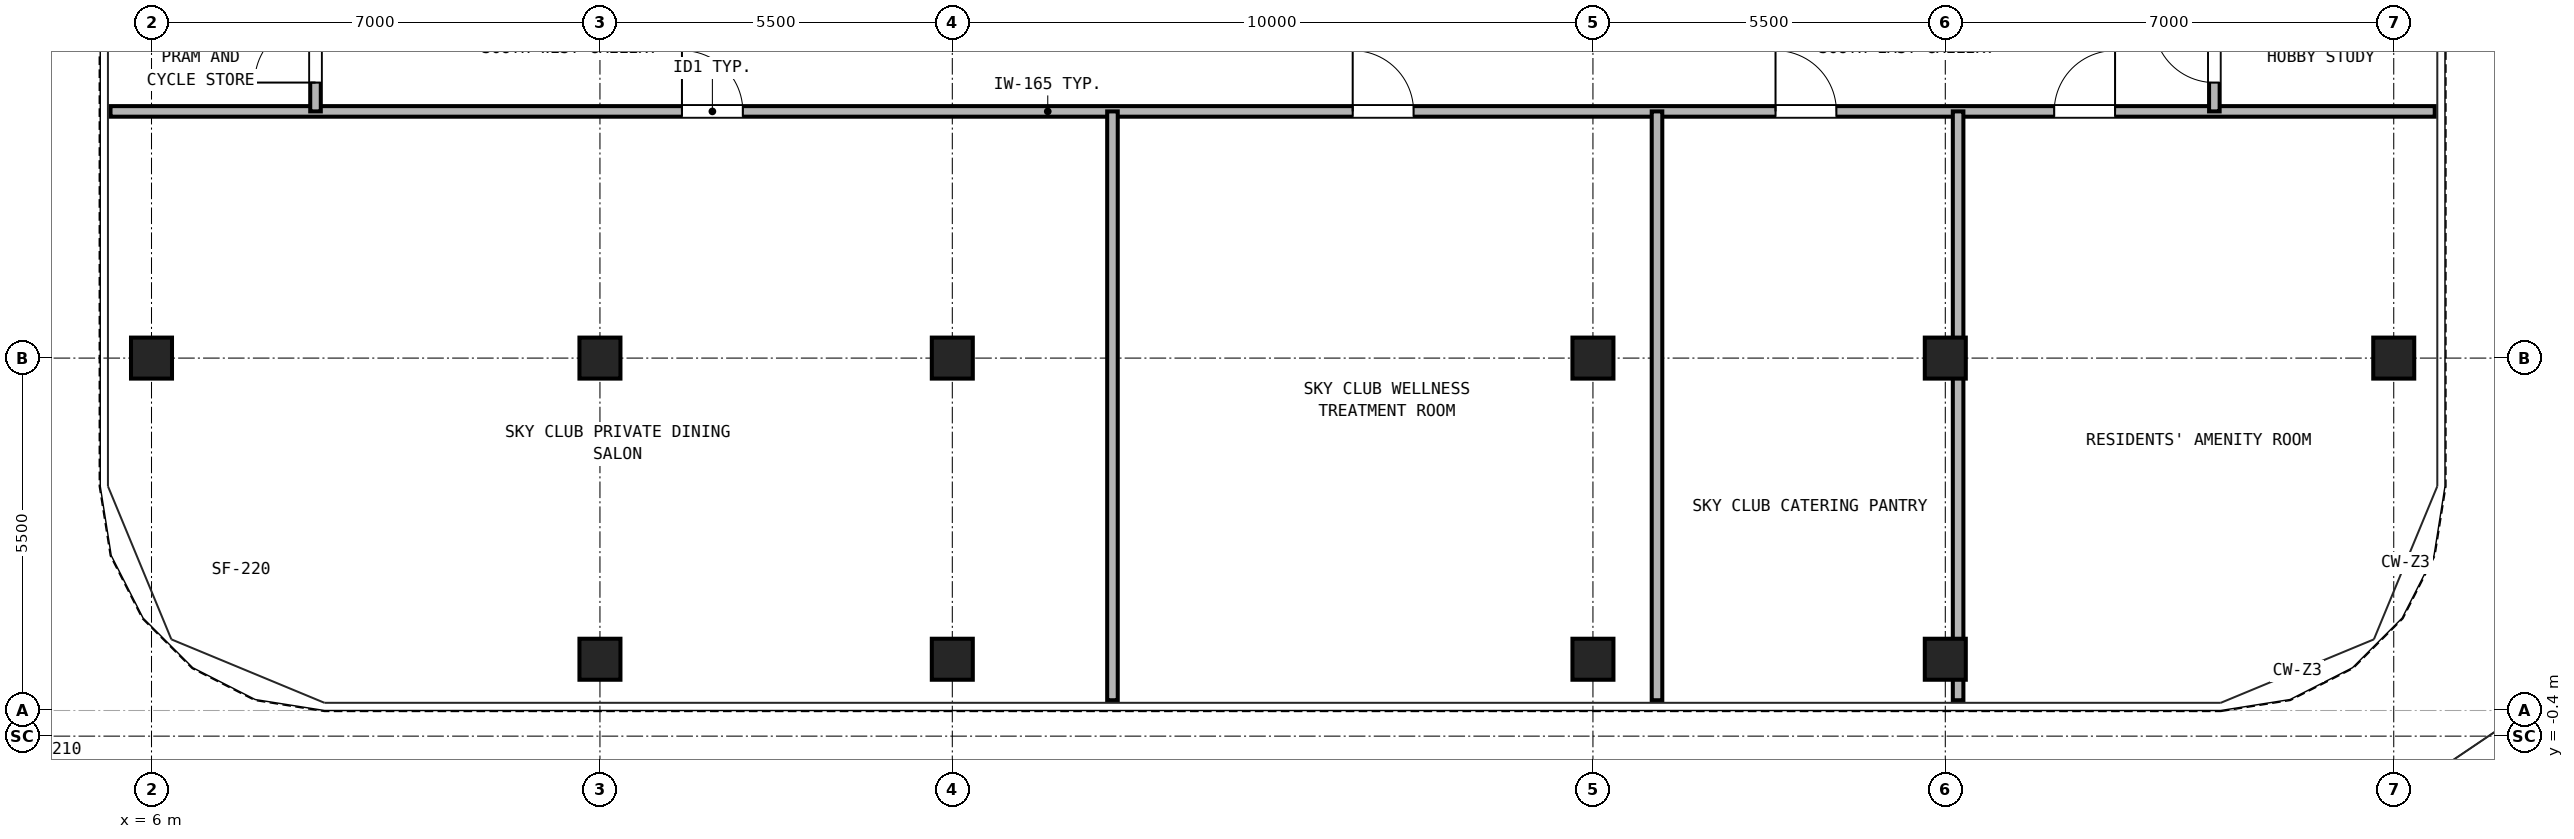
"""IFC4 building model, lengths in metres.
Left out: names, types, materials, properties, quantities, classifications, styles, units other than length and angle.
Written with IfcOpenShell. Run it as: python <this file> out.ifc"""

import sys

from ifc_helpers import new_model, si_unit, direction, frame, frame_2d, origin, origin_2d, place, context, subcontext, project, spatial, rectangle, hollow_rectangle, extrude, source, transform, mapped, element, fill, save


model = new_model("IFC4")
c1 = context("Model", 3, precision=1e-05, world=origin(), true_north=direction((0.0, 1.0)))
c2 = subcontext(c1, "Body", "Model", "MODEL_VIEW")
j1 = project(units=[si_unit("LENGTHUNIT", "METRE"), si_unit("PLANEANGLEUNIT", "RADIAN")], contexts=[c1])
p1 = place(None, origin())
s1 = spatial("IfcSite", under=j1, at=p1, CompositionType="ELEMENT")
p2 = place(p1, origin())
s2 = spatial("IfcBuilding", under=s1, at=p2, CompositionType="ELEMENT")
p3 = place(p2, frame((0.0, 0.0, 268.1)))
s3 = spatial("IfcBuildingStorey", under=s2, at=p3, CompositionType="ELEMENT", Elevation=268.1)
m1 = source(origin(), c2, "Body", "SweptSolid", [
    extrude(hollow_rectangle(XDim=0.64, YDim=0.64, WallThickness=0.035, at=origin_2d()), origin(), (0.0, 0.0, 1.0), 2.98),
])
for number, where, z_axis, x_axis in (
    (1, (13.0, 0.8, 0.0), (0.0, 0.0, 1.0), (1.0, 0.0, 0.0)),
    (2, (18.5, 0.8, 0.0), (0.0, 0.0, 1.0), (1.0, 0.0, 0.0)),
    (3, (28.5, 0.8, 0.0), (0.0, 0.0, 1.0), (1.0, 0.0, 0.0)),
    (4, (34.0, 0.8, 0.0), (0.0, 0.0, 1.0), (1.0, 0.0, 0.0)),
    (5, (6.0, 5.5, 0.0), (0.0, 0.0, 1.0), (1.0, 0.0, 0.0)),
    (6, (41.0, 5.5, 0.0), (0.0, 0.0, 1.0), (1.0, 0.0, 0.0)),
    (7, (13.0, 5.5, 0.0), (0.0, 0.0, 1.0), (1.0, 0.0, 0.0)),
    (8, (18.5, 5.5, 0.0), (0.0, 0.0, 1.0), (1.0, 0.0, 0.0)),
    (9, (28.5, 5.5, 0.0), (0.0, 0.0, 1.0), (1.0, 0.0, 0.0)),
    (10, (34.0, 5.5, 0.0), (0.0, 0.0, 1.0), (1.0, 0.0, 0.0)),
):
    element("IfcColumn", number, at=place(p3, frame(where, z_axis=z_axis, x_axis=x_axis)), inside=s3, PredefinedType="COLUMN", context=c2, shape_type="MappedRepresentation", body=[
        mapped(m1, transform((0.0, 0.0, 0.0), x_axis=(1.0, 0.0, 0.0), y_axis=(0.0, 1.0, 0.0), z_axis=(0.0, 0.0, 1.0), scale=1.0)),
    ])
p4 = place(p3, frame((5.36, 9.35, 0.0), z_axis=(0.0, 0.0, 1.0), x_axis=(1.0, 0.0, 0.0)))
e11 = element("IfcWall", 11, at=p4, inside=s3, PredefinedType="PARTITIONING", context=c2, shape_type="SweptSolid", body=[
    extrude(rectangle(XDim=36.28, YDim=0.165, at=frame_2d((18.14, 0.0))), origin(), (0.0, 0.0, 1.0), 2.98),
])
p5 = place(p4, frame((8.92, 0.0, 0.0)))
e12 = element("IfcOpeningElement", 12, at=p5, cuts=e11, PredefinedType="OPENING", context=c2, shape_type="SweptSolid", body=[
    extrude(rectangle(XDim=0.95, YDim=2.15, at=frame_2d((0.475, 1.075))), frame((0.0, 0.093, 0.0), z_axis=(0.0, -1.0, 0.0), x_axis=(1.0, 0.0, 0.0)), (0.0, 0.0, 1.0), 0.185),
])
p6 = place(p4, frame((19.39, 0.0, 0.0)))
e13 = element("IfcOpeningElement", 13, at=p6, cuts=e11, PredefinedType="OPENING", context=c2, shape_type="SweptSolid", body=[
    extrude(rectangle(XDim=0.95, YDim=2.15, at=frame_2d((0.475, 1.075))), frame((0.0, 0.093, 0.0), z_axis=(0.0, -1.0, 0.0), x_axis=(1.0, 0.0, 0.0)), (0.0, 0.0, 1.0), 0.185),
])
p7 = place(p4, frame((25.99, 0.0, 0.0)))
e14 = element("IfcOpeningElement", 14, at=p7, cuts=e11, PredefinedType="OPENING", context=c2, shape_type="SweptSolid", body=[
    extrude(rectangle(XDim=0.95, YDim=2.15, at=frame_2d((0.475, 1.075))), frame((0.0, 0.093, 0.0), z_axis=(0.0, -1.0, 0.0), x_axis=(1.0, 0.0, 0.0)), (0.0, 0.0, 1.0), 0.185),
])
p8 = place(p4, frame((30.34, 0.0, 0.0)))
e15 = element("IfcOpeningElement", 15, at=p8, cuts=e11, PredefinedType="OPENING", context=c2, shape_type="SweptSolid", body=[
    extrude(rectangle(XDim=0.95, YDim=2.15, at=frame_2d((0.475, 1.075))), frame((0.0, 0.093, 0.0), z_axis=(0.0, -1.0, 0.0), x_axis=(1.0, 0.0, 0.0)), (0.0, 0.0, 1.0), 0.185),
])
p9 = place(p3, frame((8.56, 9.35, 0.0), z_axis=(0.0, 0.0, 1.0), x_axis=(0.0, 1.0, 0.0)))
e16 = element("IfcWall", 16, at=p9, inside=s3, PredefinedType="PARTITIONING", context=c2, shape_type="SweptSolid", body=[
    extrude(rectangle(XDim=2.0, YDim=0.165, at=frame_2d((1.0, 0.0))), origin(), (0.0, 0.0, 1.0), 2.98),
])
p10 = place(p9, frame((0.45, 0.0, 0.0)))
e17 = element("IfcOpeningElement", 17, at=p10, cuts=e16, PredefinedType="OPENING", context=c2, shape_type="SweptSolid", body=[
    extrude(rectangle(XDim=0.95, YDim=2.15, at=frame_2d((0.475, 1.075))), frame((0.0, 0.093, 0.0), z_axis=(0.0, -1.0, 0.0), x_axis=(1.0, 0.0, 0.0)), (0.0, 0.0, 1.0), 0.185),
])
p11 = place(p3, frame((38.2, 9.35, 0.0), z_axis=(0.0, 0.0, 1.0), x_axis=(0.0, 1.0, 0.0)))
e18 = element("IfcWall", 18, at=p11, inside=s3, PredefinedType="PARTITIONING", context=c2, shape_type="SweptSolid", body=[
    extrude(rectangle(XDim=2.0, YDim=0.165, at=frame_2d((1.0, 0.0))), origin(), (0.0, 0.0, 1.0), 2.98),
])
p12 = place(p11, frame((0.45, 0.0, 0.0)))
e19 = element("IfcOpeningElement", 19, at=p12, cuts=e18, PredefinedType="OPENING", context=c2, shape_type="SweptSolid", body=[
    extrude(rectangle(XDim=0.95, YDim=2.15, at=frame_2d((0.475, 1.075))), frame((0.0, 0.093, 0.0), z_axis=(0.0, -1.0, 0.0), x_axis=(1.0, 0.0, 0.0)), (0.0, 0.0, 1.0), 0.185),
])
for number, where, z_axis, x_axis in (
    (20, (21.0, 0.16, 0.0), (0.0, 0.0, 1.0), (0.0, 1.0, 0.0)),
    (21, (29.5, 0.16, 0.0), (0.0, 0.0, 1.0), (0.0, 1.0, 0.0)),
):
    element("IfcWall", number, at=place(p3, frame(where, z_axis=z_axis, x_axis=x_axis)), inside=s3, PredefinedType="PARTITIONING", context=c2, shape_type="SweptSolid", body=[
        extrude(rectangle(XDim=9.19, YDim=0.165, at=frame_2d((4.595, 0.0))), origin(), (0.0, 0.0, 1.0), 2.98),
    ])
p13 = place(p3, frame((34.2, 0.16, 0.0), z_axis=(0.0, 0.0, 1.0), x_axis=(0.0, 1.0, 0.0)))
e22 = element("IfcWall", 22, at=p13, inside=s3, PredefinedType="PARTITIONING", context=c2, shape_type="SweptSolid", body=[
    extrude(rectangle(XDim=9.19, YDim=0.165, at=frame_2d((4.595, 0.0))), origin(), (0.0, 0.0, 1.0), 2.428),
])
p14 = place(p5, frame((0.95, 0.0, 0.0), z_axis=(0.0, 0.0, 1.0), x_axis=(-1.0, 0.0, 0.0)))
e23 = element("IfcDoor", 23, at=p14, inside=s3, OperationType="SINGLE_SWING_LEFT", PredefinedType="DOOR", context=c2, shape_type="SweptSolid", body=[
    extrude(rectangle(XDim=0.95, YDim=2.15, at=frame_2d((0.475, 1.075))), frame((0.0, 0.025, 0.0), z_axis=(0.0, -1.0, 0.0), x_axis=(1.0, 0.0, 0.0)), (0.0, 0.0, 1.0), 0.05),
])
fill(e12, e23)
p15 = place(p6, frame((0.95, 0.0, 0.0), z_axis=(0.0, 0.0, 1.0), x_axis=(-1.0, 0.0, 0.0)))
e24 = element("IfcDoor", 24, at=p15, inside=s3, OperationType="SINGLE_SWING_LEFT", PredefinedType="DOOR", context=c2, shape_type="SweptSolid", body=[
    extrude(rectangle(XDim=0.95, YDim=2.15, at=frame_2d((0.475, 1.075))), frame((0.0, 0.025, 0.0), z_axis=(0.0, -1.0, 0.0), x_axis=(1.0, 0.0, 0.0)), (0.0, 0.0, 1.0), 0.05),
])
fill(e13, e24)
p16 = place(p7, frame((0.95, 0.0, 0.0), z_axis=(0.0, 0.0, 1.0), x_axis=(-1.0, 0.0, 0.0)))
e25 = element("IfcDoor", 25, at=p16, inside=s3, OperationType="SINGLE_SWING_LEFT", PredefinedType="DOOR", context=c2, shape_type="SweptSolid", body=[
    extrude(rectangle(XDim=0.95, YDim=2.15, at=frame_2d((0.475, 1.075))), frame((0.0, 0.025, 0.0), z_axis=(0.0, -1.0, 0.0), x_axis=(1.0, 0.0, 0.0)), (0.0, 0.0, 1.0), 0.05),
])
fill(e14, e25)
p17 = place(p8, frame((0.95, 0.0, 0.0), z_axis=(0.0, 0.0, 1.0), x_axis=(-1.0, 0.0, 0.0)))
e26 = element("IfcDoor", 26, at=p17, inside=s3, OperationType="SINGLE_SWING_RIGHT", PredefinedType="DOOR", context=c2, shape_type="SweptSolid", body=[
    extrude(rectangle(XDim=0.95, YDim=2.15, at=frame_2d((0.475, 1.075))), frame((0.0, 0.025, 0.0), z_axis=(0.0, -1.0, 0.0), x_axis=(1.0, 0.0, 0.0)), (0.0, 0.0, 1.0), 0.05),
])
fill(e15, e26)
p18 = place(p10, frame((0.95, 0.0, 0.0), z_axis=(0.0, 0.0, 1.0), x_axis=(-1.0, 0.0, 0.0)))
e27 = element("IfcDoor", 27, at=p18, inside=s3, OperationType="SINGLE_SWING_LEFT", PredefinedType="DOOR", context=c2, shape_type="SweptSolid", body=[
    extrude(rectangle(XDim=0.95, YDim=2.15, at=frame_2d((0.475, 1.075))), frame((0.0, 0.025, 0.0), z_axis=(0.0, -1.0, 0.0), x_axis=(1.0, 0.0, 0.0)), (0.0, 0.0, 1.0), 0.05),
])
fill(e17, e27)
p19 = place(p12, origin())
e28 = element("IfcDoor", 28, at=p19, inside=s3, OperationType="SINGLE_SWING_RIGHT", PredefinedType="DOOR", context=c2, shape_type="SweptSolid", body=[
    extrude(rectangle(XDim=0.95, YDim=2.15, at=frame_2d((0.475, 1.075))), frame((0.0, 0.025, 0.0), z_axis=(0.0, -1.0, 0.0), x_axis=(1.0, 0.0, 0.0)), (0.0, 0.0, 1.0), 0.05),
])
fill(e19, e28)
save(model, sys.argv[1])
